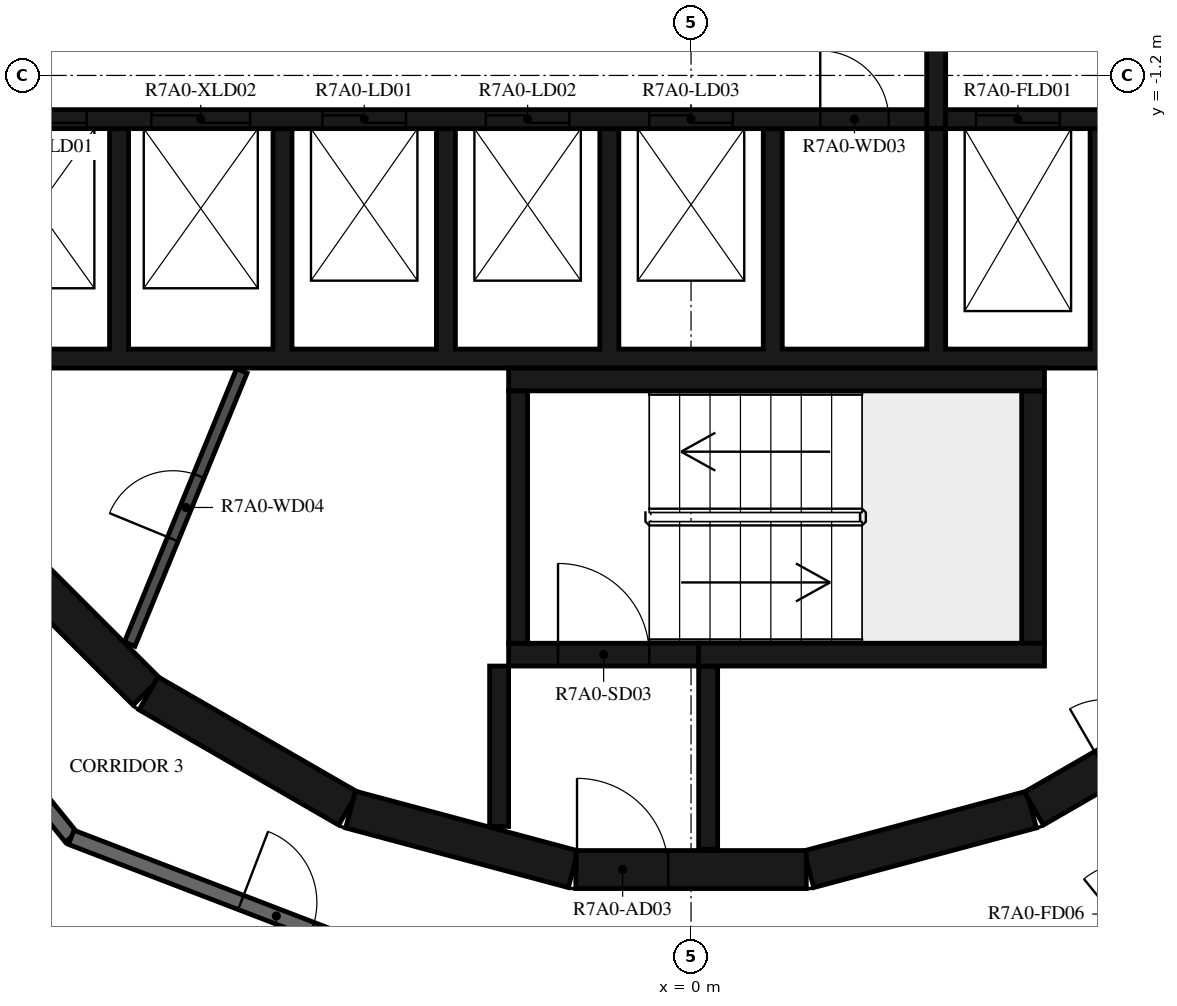
"""IFC4 building model, lengths in metres.
Left out: names, types, materials, properties, quantities, classifications, styles, units other than length and angle.
Written with IfcOpenShell. Run it as: python <this file> out.ifc"""

import sys

from ifc_helpers import new_model, si_unit, direction, frame, frame_2d, origin, place, context, subcontext, project, spatial, polyline, rectangle, outline, extrude, element, fill, save


model = new_model("IFC4")
c1 = context("Model", 3, precision=1e-05, world=origin(), true_north=direction((0.0, 1.0)))
c2 = subcontext(c1, "Body", "Model", "MODEL_VIEW")
j1 = project(units=[si_unit("LENGTHUNIT", "METRE"), si_unit("PLANEANGLEUNIT", "RADIAN")], contexts=[c1])
p1 = place(None, origin())
s1 = spatial("IfcSite", under=j1, at=p1, CompositionType="ELEMENT")
p2 = place(p1, origin())
s2 = spatial("IfcBuilding", under=s1, at=p2, CompositionType="ELEMENT")
p3 = place(p2, frame((0.0, 0.0, 270.4)))
s3 = spatial("IfcBuildingStorey", under=s2, at=p3, CompositionType="ELEMENT", Elevation=270.4)
p4 = place(p3, frame((1.55, -11.643, 0.0), z_axis=(0.0, 0.0, 1.0), x_axis=(0.965948410781, 0.258734743916, 0.0)))
e1 = element("IfcWall", 1, at=p4, inside=s3, PredefinedType="SHEAR", context=c2, shape_type="SweptSolid", body=[
    extrude(rectangle(XDim=3.033, YDim=0.5, at=frame_2d((1.516, 0.0))), origin(), (0.0, 0.0, 1.0), 3.12),
])
p5 = place(p3, frame((4.51, -10.845, 0.0), z_axis=(0.0, 0.0, 1.0), x_axis=(0.865975092491, 0.500087131594, 0.0)))
e2 = element("IfcWall", 2, at=p5, inside=s3, PredefinedType="SHEAR", context=c2, shape_type="SweptSolid", body=[
    extrude(rectangle(XDim=3.033, YDim=0.5, at=frame_2d((1.516, 0.0))), origin(), (0.0, 0.0, 1.0), 3.12),
])
p6 = place(p5, frame((1.066, 0.0, 0.0)))
e3 = element("IfcOpeningElement", 3, at=p6, cuts=e2, PredefinedType="OPENING", context=c2, shape_type="SweptSolid", body=[
    extrude(rectangle(XDim=0.9, YDim=2.1, at=frame_2d((0.45, 1.05))), frame((0.0, 0.26, 0.0), z_axis=(0.0, -1.0, 0.0), x_axis=(1.0, 0.0, 0.0)), (0.0, 0.0, 1.0), 0.52),
])
p7 = place(p3, frame((-9.308, -7.164, 0.0), z_axis=(0.0, 0.0, 1.0), x_axis=(0.707106781187, -0.707106781187, 0.0)))
e4 = element("IfcWall", 4, at=p7, inside=s3, PredefinedType="SHEAR", context=c2, shape_type="SweptSolid", body=[
    extrude(rectangle(XDim=3.032, YDim=0.5, at=frame_2d((1.516, 0.0))), origin(), (0.0, 0.0, 1.0), 3.12),
])
for number, where, z_axis, x_axis in (
    (5, (-7.137, -9.329, 0.0), (0.0, 0.0, 1.0), (0.866, -0.5, 0.0)),
    (6, (-4.479, -10.858, 0.0), (0.0, 0.0, 1.0), (0.966, -0.259, 0.0)),
):
    element("IfcWall", number, at=place(p3, frame(where, z_axis=z_axis, x_axis=x_axis)), inside=s3, PredefinedType="SHEAR", context=c2, shape_type="SweptSolid", body=[
        extrude(rectangle(XDim=3.033, YDim=0.5, at=frame_2d((1.516, 0.0))), origin(), (0.0, 0.0, 1.0), 3.12),
    ])
p8 = place(p3, frame((-1.516, -11.647, 0.0), z_axis=(0.0, 0.0, 1.0), x_axis=(1.0, 0.0, 0.0)))
e7 = element("IfcWall", 7, at=p8, inside=s3, PredefinedType="SHEAR", context=c2, shape_type="SweptSolid", body=[
    extrude(rectangle(XDim=3.033, YDim=0.5, at=frame_2d((1.516, 0.0))), origin(), (0.0, 0.0, 1.0), 3.12),
])
p9 = place(p8, frame((0.016, 0.0, 0.0)))
e8 = element("IfcOpeningElement", 8, at=p9, cuts=e7, PredefinedType="OPENING", context=c2, shape_type="SweptSolid", body=[
    extrude(rectangle(XDim=1.2, YDim=2.1, at=frame_2d((0.6, 1.05))), frame((0.0, 0.26, 0.0), z_axis=(0.0, -1.0, 0.0), x_axis=(1.0, 0.0, 0.0)), (0.0, 0.0, 1.0), 0.52),
])
p10 = place(p3, frame((-2.275, -8.67, 0.0), z_axis=(0.0, 0.0, 1.0), x_axis=(0.0, 1.0, 0.0)))
e9 = element("IfcWall", 9, at=p10, inside=s3, PredefinedType="SHEAR", context=c2, shape_type="SweptSolid", body=[
    extrude(rectangle(XDim=3.32, YDim=0.25, at=frame_2d((1.66, 0.0))), origin(), (0.0, 0.0, 1.0), 3.12),
])
p11 = place(p3, frame((-2.4, -5.2, 0.0), z_axis=(0.0, 0.0, 1.0), x_axis=(1.0, 0.0, 0.0)))
e10 = element("IfcWall", 10, at=p11, inside=s3, PredefinedType="SHEAR", context=c2, shape_type="SweptSolid", body=[
    extrude(rectangle(XDim=7.05, YDim=0.3, at=frame_2d((3.525, 0.0))), origin(), (0.0, 0.0, 1.0), 3.12),
])
p12 = place(p3, frame((4.5, -8.67, 0.0), z_axis=(0.0, 0.0, 1.0), x_axis=(0.0, 1.0, 0.0)))
e11 = element("IfcWall", 11, at=p12, inside=s3, PredefinedType="SHEAR", context=c2, shape_type="SweptSolid", body=[
    extrude(rectangle(XDim=3.32, YDim=0.3, at=frame_2d((1.66, 0.0))), origin(), (0.0, 0.0, 1.0), 3.12),
])
p13 = place(p3, frame((0.1, -8.82, 0.0), z_axis=(0.0, 0.0, 1.0), x_axis=(1.0, 0.0, 0.0)))
e12 = element("IfcWall", 12, at=p13, inside=s3, PredefinedType="SHEAR", context=c2, shape_type="SweptSolid", body=[
    extrude(rectangle(XDim=4.55, YDim=0.3, at=frame_2d((2.275, 0.0))), origin(), (0.0, 0.0, 1.0), 3.12),
])
p14 = place(p3, frame((-2.4, -8.82, 0.0), z_axis=(0.0, 0.0, 1.0), x_axis=(1.0, 0.0, 0.0)))
e13 = element("IfcWall", 13, at=p14, inside=s3, PredefinedType="SHEAR", context=c2, shape_type="SweptSolid", body=[
    extrude(rectangle(XDim=2.5, YDim=0.3, at=frame_2d((1.25, 0.0))), origin(), (0.0, 0.0, 1.0), 3.12),
])
p15 = place(p14, frame((0.65, 0.0, 0.0)))
e14 = element("IfcOpeningElement", 14, at=p15, cuts=e13, PredefinedType="OPENING", context=c2, shape_type="SweptSolid", body=[
    extrude(rectangle(XDim=1.2, YDim=2.1, at=frame_2d((0.6, 1.05))), frame((0.0, 0.16, 0.0), z_axis=(0.0, -1.0, 0.0), x_axis=(1.0, 0.0, 0.0)), (0.0, 0.0, 1.0), 0.32),
])
p16 = place(p3, frame((-2.525, -8.97, 0.0), z_axis=(0.0, 0.0, 1.0), x_axis=(0.0, -1.0, 0.0)))
e15 = element("IfcWall", 15, at=p16, inside=s3, PredefinedType="SHEAR", context=c2, shape_type="SweptSolid", body=[
    extrude(rectangle(XDim=2.11, YDim=0.25, at=frame_2d((1.055, 0.0))), origin(), (0.0, 0.0, 1.0), 3.12),
])
p17 = place(p3, frame((0.225, -8.97, 0.0), z_axis=(0.0, 0.0, 1.0), x_axis=(0.0, -1.0, 0.0)))
e16 = element("IfcWall", 16, at=p17, inside=s3, PredefinedType="SHEAR", context=c2, shape_type="SweptSolid", body=[
    extrude(rectangle(XDim=2.41, YDim=0.25, at=frame_2d((1.205, 0.0))), origin(), (0.0, 0.0, 1.0), 3.12),
])
p18 = place(p3, origin())
e17 = element("IfcWall", 17, at=p18, inside=s3, PredefinedType="SHEAR", context=c2, shape_type="SweptSolid", body=[
    extrude(outline(polyline([(9.8, -5.05), (9.8, -4.8), (9.8, -1.9), (9.55, -1.9), (9.55, -4.8), (7.65, -4.8), (7.65, -1.9), (7.4, -1.9), (7.4, -4.8), (5.5, -4.8), (5.5, -1.9), (5.25, -1.9), (5.25, -4.8), (3.35, -4.8), (3.35, -1.9), (3.1, -1.9), (3.1, -4.8), (1.2, -4.8), (1.2, -1.9), (0.95, -1.9), (0.95, -4.8), (-0.95, -4.8), (-0.95, -1.9), (-1.2, -1.9), (-1.2, -4.8), (-3.1, -4.8), (-3.1, -1.9), (-3.35, -1.9), (-3.35, -4.8), (-5.25, -4.8), (-5.25, -1.9), (-5.5, -1.9), (-5.5, -4.8), (-7.4, -4.8), (-7.4, -1.9), (-7.65, -1.9), (-7.65, -4.8), (-9.55, -4.8), (-9.55, -1.9), (-9.8, -1.9), (-9.8, -4.8), (-9.8, -5.05), (9.8, -5.05)])), origin(), (0.0, 0.0, 1.0), 3.12),
])
p19 = place(p3, frame((-11.28, -1.775, 0.0), z_axis=(0.0, 0.0, 1.0), x_axis=(1.0, 0.0, 0.0)))
e18 = element("IfcWall", 18, at=p19, inside=s3, PredefinedType="SHEAR", context=c2, shape_type="SweptSolid", body=[
    extrude(rectangle(XDim=14.38, YDim=0.25, at=frame_2d((7.19, 0.0))), origin(), (0.0, 0.0, 1.0), 3.12),
])
p20 = place(p19, frame((2.03, 0.0, 0.0)))
e19 = element("IfcOpeningElement", 19, at=p20, cuts=e18, PredefinedType="OPENING", context=c2, shape_type="SweptSolid", body=[
    extrude(rectangle(XDim=1.3, YDim=2.1, at=frame_2d((0.65, 1.05))), frame((0.0, 0.135, 0.0), z_axis=(0.0, -1.0, 0.0), x_axis=(1.0, 0.0, 0.0)), (0.0, 0.0, 1.0), 0.27),
])
p21 = place(p19, frame((4.18, 0.0, 0.0)))
e20 = element("IfcOpeningElement", 20, at=p21, cuts=e18, PredefinedType="OPENING", context=c2, shape_type="SweptSolid", body=[
    extrude(rectangle(XDim=1.3, YDim=2.1, at=frame_2d((0.65, 1.05))), frame((0.0, 0.135, 0.0), z_axis=(0.0, -1.0, 0.0), x_axis=(1.0, 0.0, 0.0)), (0.0, 0.0, 1.0), 0.27),
])
p22 = place(p19, frame((6.43, 0.0, 0.0)))
e21 = element("IfcOpeningElement", 21, at=p22, cuts=e18, PredefinedType="OPENING", context=c2, shape_type="SweptSolid", body=[
    extrude(rectangle(XDim=1.1, YDim=2.1, at=frame_2d((0.55, 1.05))), frame((0.0, 0.135, 0.0), z_axis=(0.0, -1.0, 0.0), x_axis=(1.0, 0.0, 0.0)), (0.0, 0.0, 1.0), 0.27),
])
p23 = place(p19, frame((8.58, 0.0, 0.0)))
e22 = element("IfcOpeningElement", 22, at=p23, cuts=e18, PredefinedType="OPENING", context=c2, shape_type="SweptSolid", body=[
    extrude(rectangle(XDim=1.1, YDim=2.1, at=frame_2d((0.55, 1.05))), frame((0.0, 0.135, 0.0), z_axis=(0.0, -1.0, 0.0), x_axis=(1.0, 0.0, 0.0)), (0.0, 0.0, 1.0), 0.27),
])
p24 = place(p19, frame((10.73, 0.0, 0.0)))
e23 = element("IfcOpeningElement", 23, at=p24, cuts=e18, PredefinedType="OPENING", context=c2, shape_type="SweptSolid", body=[
    extrude(rectangle(XDim=1.1, YDim=2.1, at=frame_2d((0.55, 1.05))), frame((0.0, 0.135, 0.0), z_axis=(0.0, -1.0, 0.0), x_axis=(1.0, 0.0, 0.0)), (0.0, 0.0, 1.0), 0.27),
])
p25 = place(p19, frame((12.98, 0.0, 0.0)))
e24 = element("IfcOpeningElement", 24, at=p25, cuts=e18, PredefinedType="OPENING", context=c2, shape_type="SweptSolid", body=[
    extrude(rectangle(XDim=0.9, YDim=2.1, at=frame_2d((0.45, 1.05))), frame((0.0, 0.135, 0.0), z_axis=(0.0, -1.0, 0.0), x_axis=(1.0, 0.0, 0.0)), (0.0, 0.0, 1.0), 0.27),
])
p26 = place(p3, frame((3.35, -1.775, 0.0), z_axis=(0.0, 0.0, 1.0), x_axis=(1.0, 0.0, 0.0)))
e25 = element("IfcWall", 25, at=p26, inside=s3, PredefinedType="SHEAR", context=c2, shape_type="SweptSolid", body=[
    extrude(rectangle(XDim=7.93, YDim=0.25, at=frame_2d((3.965, 0.0))), origin(), (0.0, 0.0, 1.0), 3.12),
])
p27 = place(p26, frame((0.4, 0.0, 0.0)))
e26 = element("IfcOpeningElement", 26, at=p27, cuts=e25, PredefinedType="OPENING", context=c2, shape_type="SweptSolid", body=[
    extrude(rectangle(XDim=1.1, YDim=2.4, at=frame_2d((0.55, 1.2))), frame((0.0, 0.135, 0.0), z_axis=(0.0, -1.0, 0.0), x_axis=(1.0, 0.0, 0.0)), (0.0, 0.0, 1.0), 0.27),
])
p28 = place(p26, frame((2.55, 0.0, 0.0)))
e27 = element("IfcOpeningElement", 27, at=p28, cuts=e25, PredefinedType="OPENING", context=c2, shape_type="SweptSolid", body=[
    extrude(rectangle(XDim=1.1, YDim=2.4, at=frame_2d((0.55, 1.2))), frame((0.0, 0.135, 0.0), z_axis=(0.0, -1.0, 0.0), x_axis=(1.0, 0.0, 0.0)), (0.0, 0.0, 1.0), 0.27),
])
p29 = place(p26, frame((4.7, 0.0, 0.0)))
e28 = element("IfcOpeningElement", 28, at=p29, cuts=e25, PredefinedType="OPENING", context=c2, shape_type="SweptSolid", body=[
    extrude(rectangle(XDim=1.1, YDim=2.4, at=frame_2d((0.55, 1.2))), frame((0.0, 0.135, 0.0), z_axis=(0.0, -1.0, 0.0), x_axis=(1.0, 0.0, 0.0)), (0.0, 0.0, 1.0), 0.27),
])
p30 = place(p3, frame((3.225, -1.9, 0.0), z_axis=(0.0, 0.0, 1.0), x_axis=(0.0, 1.0, 0.0)))
e29 = element("IfcWall", 29, at=p30, inside=s3, PredefinedType="SHEAR", context=c2, shape_type="SweptSolid", body=[
    extrude(rectangle(XDim=3.8, YDim=0.25, at=frame_2d((1.9, 0.0))), origin(), (0.0, 0.0, 1.0), 3.12),
])
p31 = place(p3, frame((-7.385, -8.681, 0.0), z_axis=(0.0, 0.0, 1.0), x_axis=(0.379804590409, 0.925066739811, 0.0)))
e30 = element("IfcWall", 30, at=p31, inside=s3, PredefinedType="PARTITIONING", context=c2, shape_type="SweptSolid", body=[
    extrude(rectangle(XDim=3.885, YDim=0.15, at=frame_2d((1.942, 0.0))), origin(), (0.0, 0.0, 1.0), 3.12),
])
p32 = place(p31, frame((1.493, 0.0, 0.0)))
e31 = element("IfcOpeningElement", 31, at=p32, cuts=e30, PredefinedType="OPENING", context=c2, shape_type="SweptSolid", body=[
    extrude(rectangle(XDim=0.9, YDim=2.1, at=frame_2d((0.45, 1.05))), frame((0.0, 0.085, 0.0), z_axis=(0.0, -1.0, 0.0), x_axis=(1.0, 0.0, 0.0)), (0.0, 0.0, 1.0), 0.17),
])
p33 = place(p3, frame((-12.673, -5.643, 0.0), z_axis=(0.0, 0.0, 1.0), x_axis=(0.629302871585, -0.777160148113, 0.0)))
e32 = element("IfcWall", 32, at=p33, inside=s3, PredefinedType="STANDARD", context=c2, shape_type="SweptSolid", body=[
    extrude(rectangle(XDim=7.181, YDim=0.2, at=frame_2d((3.59, 0.0))), origin(), (0.0, 0.0, 1.0), 3.12),
])
p34 = place(p3, frame((-8.154, -11.223, 0.0), z_axis=(0.0, 0.0, 1.0), x_axis=(0.93359073609, -0.358341090983, 0.0)))
e33 = element("IfcWall", 33, at=p34, inside=s3, PredefinedType="STANDARD", context=c2, shape_type="SweptSolid", body=[
    extrude(rectangle(XDim=7.181, YDim=0.2, at=frame_2d((3.59, 0.0))), origin(), (0.0, 0.0, 1.0), 3.12),
])
p35 = place(p34, frame((2.39, 0.0, 0.0)))
e34 = element("IfcOpeningElement", 34, at=p35, cuts=e33, PredefinedType="OPENING", context=c2, shape_type="SweptSolid", body=[
    extrude(rectangle(XDim=1.0, YDim=2.1, at=frame_2d((0.5, 1.05))), frame((0.0, 0.11, 0.0), z_axis=(0.0, -1.0, 0.0), x_axis=(1.0, 0.0, 0.0)), (0.0, 0.0, 1.0), 0.22),
])
p36 = place(p15, origin())
e35 = element("IfcDoor", 35, at=p36, inside=s3, OperationType="SINGLE_SWING_LEFT", PredefinedType="DOOR", context=c2, shape_type="SweptSolid", body=[
    extrude(rectangle(XDim=1.2, YDim=2.1, at=frame_2d((0.6, 1.05))), frame((0.0, 0.025, 0.0), z_axis=(0.0, -1.0, 0.0), x_axis=(1.0, 0.0, 0.0)), (0.0, 0.0, 1.0), 0.05),
])
fill(e14, e35)
p37 = place(p9, origin())
e36 = element("IfcDoor", 36, at=p37, inside=s3, OperationType="SINGLE_SWING_RIGHT", PredefinedType="DOOR", context=c2, shape_type="SweptSolid", body=[
    extrude(rectangle(XDim=1.2, YDim=2.1, at=frame_2d((0.6, 1.05))), frame((0.0, 0.025, 0.0), z_axis=(0.0, -1.0, 0.0), x_axis=(1.0, 0.0, 0.0)), (0.0, 0.0, 1.0), 0.05),
])
fill(e8, e36)
p38 = place(p20, origin())
e37 = element("IfcDoor", 37, at=p38, inside=s3, OperationType="DOUBLE_DOOR_SLIDING", PredefinedType="DOOR", context=c2, shape_type="SweptSolid", body=[
    extrude(rectangle(XDim=1.3, YDim=2.1, at=frame_2d((0.65, 1.05))), frame((0.0, 0.025, 0.0), z_axis=(0.0, -1.0, 0.0), x_axis=(1.0, 0.0, 0.0)), (0.0, 0.0, 1.0), 0.05),
])
fill(e19, e37)
p39 = place(p21, origin())
e38 = element("IfcDoor", 38, at=p39, inside=s3, OperationType="DOUBLE_DOOR_SLIDING", PredefinedType="DOOR", context=c2, shape_type="SweptSolid", body=[
    extrude(rectangle(XDim=1.3, YDim=2.1, at=frame_2d((0.65, 1.05))), frame((0.0, 0.025, 0.0), z_axis=(0.0, -1.0, 0.0), x_axis=(1.0, 0.0, 0.0)), (0.0, 0.0, 1.0), 0.05),
])
fill(e20, e38)
p40 = place(p22, origin())
e39 = element("IfcDoor", 39, at=p40, inside=s3, OperationType="DOUBLE_DOOR_SLIDING", PredefinedType="DOOR", context=c2, shape_type="SweptSolid", body=[
    extrude(rectangle(XDim=1.1, YDim=2.1, at=frame_2d((0.55, 1.05))), frame((0.0, 0.025, 0.0), z_axis=(0.0, -1.0, 0.0), x_axis=(1.0, 0.0, 0.0)), (0.0, 0.0, 1.0), 0.05),
])
fill(e21, e39)
p41 = place(p23, origin())
e40 = element("IfcDoor", 40, at=p41, inside=s3, OperationType="DOUBLE_DOOR_SLIDING", PredefinedType="DOOR", context=c2, shape_type="SweptSolid", body=[
    extrude(rectangle(XDim=1.1, YDim=2.1, at=frame_2d((0.55, 1.05))), frame((0.0, 0.025, 0.0), z_axis=(0.0, -1.0, 0.0), x_axis=(1.0, 0.0, 0.0)), (0.0, 0.0, 1.0), 0.05),
])
fill(e22, e40)
p42 = place(p24, origin())
e41 = element("IfcDoor", 41, at=p42, inside=s3, OperationType="DOUBLE_DOOR_SLIDING", PredefinedType="DOOR", context=c2, shape_type="SweptSolid", body=[
    extrude(rectangle(XDim=1.1, YDim=2.1, at=frame_2d((0.55, 1.05))), frame((0.0, 0.025, 0.0), z_axis=(0.0, -1.0, 0.0), x_axis=(1.0, 0.0, 0.0)), (0.0, 0.0, 1.0), 0.05),
])
fill(e23, e41)
p43 = place(p27, origin())
e42 = element("IfcDoor", 42, at=p43, inside=s3, OperationType="DOUBLE_DOOR_SLIDING", PredefinedType="DOOR", context=c2, shape_type="SweptSolid", body=[
    extrude(rectangle(XDim=1.1, YDim=2.4, at=frame_2d((0.55, 1.2))), frame((0.0, 0.025, 0.0), z_axis=(0.0, -1.0, 0.0), x_axis=(1.0, 0.0, 0.0)), (0.0, 0.0, 1.0), 0.05),
])
fill(e26, e42)
p44 = place(p25, origin())
e43 = element("IfcDoor", 43, at=p44, inside=s3, OperationType="SINGLE_SWING_LEFT", PredefinedType="DOOR", context=c2, shape_type="SweptSolid", body=[
    extrude(rectangle(XDim=0.9, YDim=2.1, at=frame_2d((0.45, 1.05))), frame((0.0, 0.025, 0.0), z_axis=(0.0, -1.0, 0.0), x_axis=(1.0, 0.0, 0.0)), (0.0, 0.0, 1.0), 0.05),
])
fill(e24, e43)
p45 = place(p32, origin())
e44 = element("IfcDoor", 44, at=p45, inside=s3, OperationType="SINGLE_SWING_RIGHT", PredefinedType="DOOR", context=c2, shape_type="SweptSolid", body=[
    extrude(rectangle(XDim=0.9, YDim=2.1, at=frame_2d((0.45, 1.05))), frame((0.0, 0.025, 0.0), z_axis=(0.0, -1.0, 0.0), x_axis=(1.0, 0.0, 0.0)), (0.0, 0.0, 1.0), 0.05),
])
fill(e31, e44)
p46 = place(p35, origin())
e45 = element("IfcDoor", 45, at=p46, inside=s3, OperationType="SINGLE_SWING_RIGHT", PredefinedType="DOOR", context=c2, shape_type="SweptSolid", body=[
    extrude(rectangle(XDim=1.0, YDim=2.1, at=frame_2d((0.5, 1.05))), frame((0.0, 0.025, 0.0), z_axis=(0.0, -1.0, 0.0), x_axis=(1.0, 0.0, 0.0)), (0.0, 0.0, 1.0), 0.05),
])
fill(e34, e45)
save(model, sys.argv[1])
